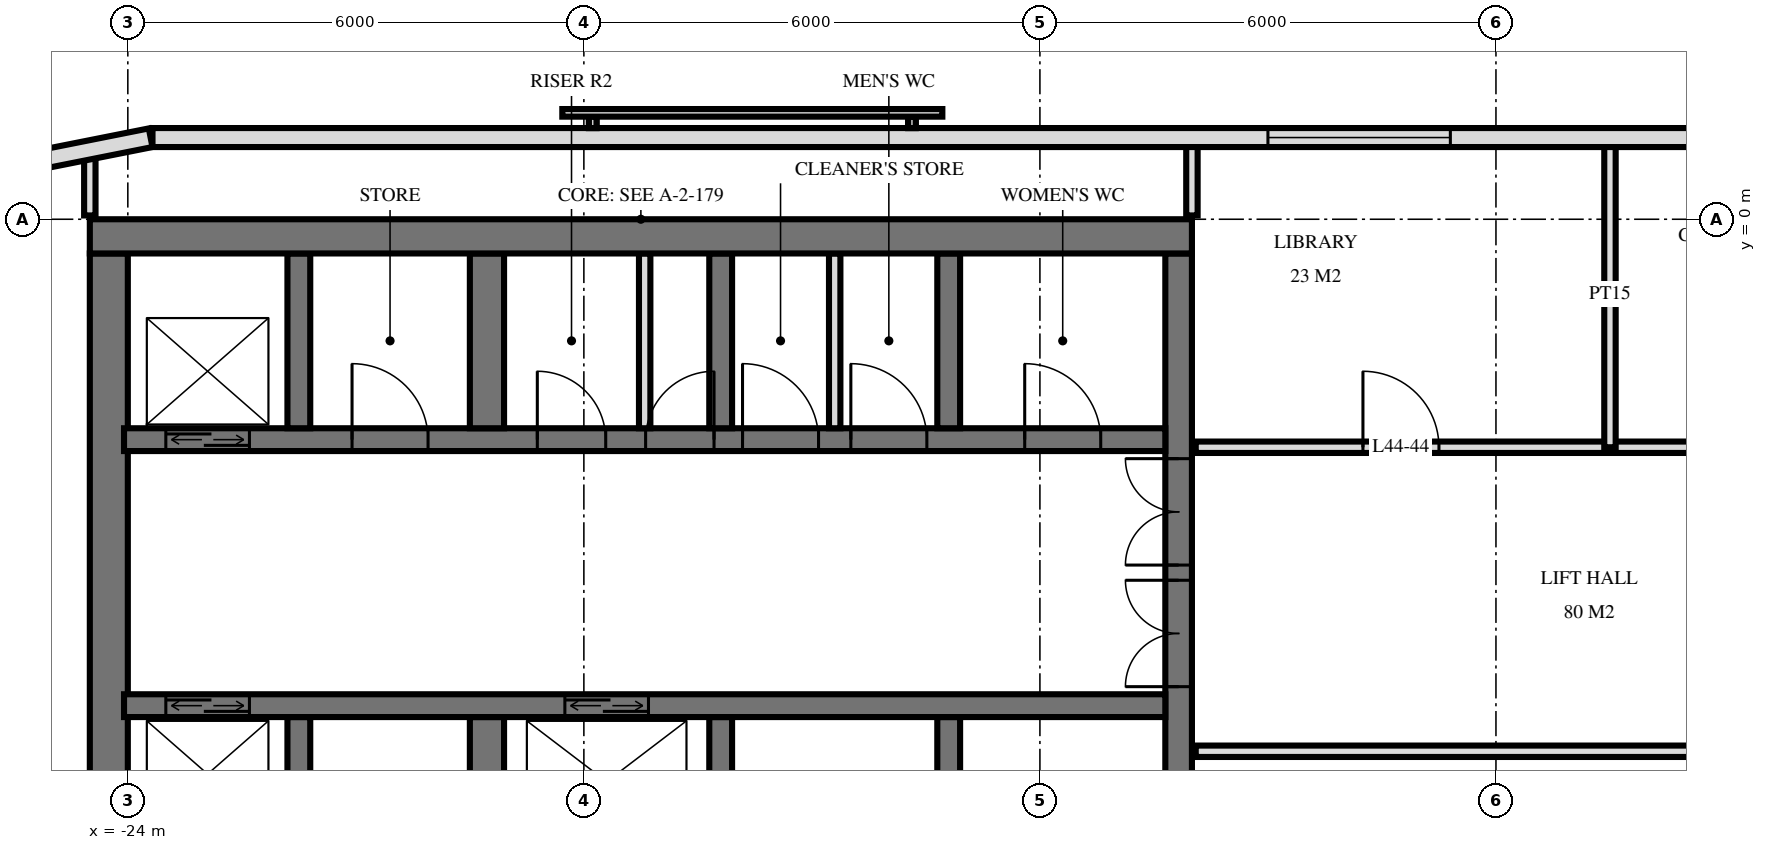
"""IFC4 building model, lengths in metres.
Left out: names, types, materials, properties, quantities, classifications, styles, units other than length and angle.
Written with IfcOpenShell. Run it as: python <this file> out.ifc"""

import sys

from ifc_helpers import new_model, si_unit, direction, frame, frame_2d, origin, place, context, subcontext, project, spatial, rectangle, extrude, element, fill, save


model = new_model("IFC4")
c1 = context("Model", 3, precision=1e-05, world=origin(), true_north=direction((0.0, 1.0)))
c2 = subcontext(c1, "Body", "Model", "MODEL_VIEW")
j1 = project(units=[si_unit("LENGTHUNIT", "METRE"), si_unit("PLANEANGLEUNIT", "RADIAN")], contexts=[c1])
p1 = place(None, origin())
s1 = spatial("IfcSite", under=j1, at=p1, CompositionType="ELEMENT")
p2 = place(p1, origin())
s2 = spatial("IfcBuilding", under=s1, at=p2, CompositionType="ELEMENT")
p3 = place(p2, frame((0.0, 0.0, 170.4)))
s3 = spatial("IfcBuildingStorey", under=s2, at=p3, CompositionType="ELEMENT", Elevation=170.4)
p4 = place(p3, frame((-24.5, -0.225, 0.0), z_axis=(0.0, 0.0, 1.0), x_axis=(1.0, 0.0, 0.0)))
e1 = element("IfcWall", 1, at=p4, inside=s3, PredefinedType="SHEAR", context=c2, shape_type="SweptSolid", body=[
    extrude(rectangle(XDim=14.5, YDim=0.45, at=frame_2d((7.25, 0.0))), origin(), (0.0, 0.0, 1.0), 3.6),
])
p5 = place(p3, frame((-10.175, -14.55, 0.0), z_axis=(0.0, 0.0, 1.0), x_axis=(0.0, 1.0, 0.0)))
e2 = element("IfcWall", 2, at=p5, inside=s3, PredefinedType="SHEAR", context=c2, shape_type="SweptSolid", body=[
    extrude(rectangle(XDim=14.1, YDim=0.35, at=frame_2d((7.05, 0.0))), origin(), (0.0, 0.0, 1.0), 3.6),
])
p6 = place(p5, frame((8.4, 0.0, 0.0)))
e3 = element("IfcOpeningElement", 3, at=p6, cuts=e2, PredefinedType="OPENING", context=c2, shape_type="SweptSolid", body=[
    extrude(rectangle(XDim=1.4, YDim=2.4, at=frame_2d((0.7, 1.2))), frame((0.0, 0.185, 0.0), z_axis=(0.0, -1.0, 0.0), x_axis=(1.0, 0.0, 0.0)), (0.0, 0.0, 1.0), 0.37),
])
p7 = place(p5, frame((10.0, 0.0, 0.0)))
e4 = element("IfcOpeningElement", 4, at=p7, cuts=e2, PredefinedType="OPENING", context=c2, shape_type="SweptSolid", body=[
    extrude(rectangle(XDim=1.4, YDim=2.4, at=frame_2d((0.7, 1.2))), frame((0.0, 0.185, 0.0), z_axis=(0.0, -1.0, 0.0), x_axis=(1.0, 0.0, 0.0)), (0.0, 0.0, 1.0), 0.37),
])
p8 = place(p5, frame((4.0, 0.0, 0.0)))
e5 = element("IfcOpeningElement", 5, at=p8, cuts=e2, PredefinedType="OPENING", context=c2, shape_type="SweptSolid", body=[
    extrude(rectangle(XDim=1.2, YDim=2.1, at=frame_2d((0.6, 1.05))), frame((0.0, 0.185, 0.0), z_axis=(0.0, -1.0, 0.0), x_axis=(1.0, 0.0, 0.0)), (0.0, 0.0, 1.0), 0.37),
])
p9 = place(p3, frame((-24.25, -14.55, 0.0), z_axis=(0.0, 0.0, 1.0), x_axis=(0.0, 1.0, 0.0)))
e6 = element("IfcWall", 6, at=p9, inside=s3, PredefinedType="SHEAR", context=c2, shape_type="SweptSolid", body=[
    extrude(rectangle(XDim=14.1, YDim=0.5, at=frame_2d((7.05, 0.0))), origin(), (0.0, 0.0, 1.0), 3.6),
])
p10 = place(p3, frame((-24.05, -2.9, 0.0), z_axis=(0.0, 0.0, 1.0), x_axis=(1.0, 0.0, 0.0)))
e7 = element("IfcWall", 7, at=p10, inside=s3, PredefinedType="SHEAR", context=c2, shape_type="SweptSolid", body=[
    extrude(rectangle(XDim=13.7, YDim=0.3, at=frame_2d((6.85, 0.0))), origin(), (0.0, 0.0, 1.0), 3.6),
])
p11 = place(p10, frame((0.55, 0.0, 0.0)))
e8 = element("IfcOpeningElement", 8, at=p11, cuts=e7, PredefinedType="OPENING", context=c2, shape_type="SweptSolid", body=[
    extrude(rectangle(XDim=1.1, YDim=2.1, at=frame_2d((0.55, 1.05))), frame((0.0, 0.16, 0.0), z_axis=(0.0, -1.0, 0.0), x_axis=(1.0, 0.0, 0.0)), (0.0, 0.0, 1.0), 0.32),
])
p12 = place(p10, frame((6.863, 0.0, 0.0)))
e9 = element("IfcOpeningElement", 9, at=p12, cuts=e7, PredefinedType="OPENING", context=c2, shape_type="SweptSolid", body=[
    extrude(rectangle(XDim=0.9, YDim=2.1, at=frame_2d((0.45, 1.05))), frame((0.0, 0.16, 0.0), z_axis=(0.0, -1.0, 0.0), x_axis=(1.0, 0.0, 0.0)), (0.0, 0.0, 1.0), 0.32),
])
p13 = place(p10, frame((5.438, 0.0, 0.0)))
e10 = element("IfcOpeningElement", 10, at=p13, cuts=e7, PredefinedType="OPENING", context=c2, shape_type="SweptSolid", body=[
    extrude(rectangle(XDim=0.9, YDim=2.1, at=frame_2d((0.45, 1.05))), frame((0.0, 0.16, 0.0), z_axis=(0.0, -1.0, 0.0), x_axis=(1.0, 0.0, 0.0)), (0.0, 0.0, 1.0), 0.32),
])
p14 = place(p10, frame((11.85, 0.0, 0.0)))
e11 = element("IfcOpeningElement", 11, at=p14, cuts=e7, PredefinedType="OPENING", context=c2, shape_type="SweptSolid", body=[
    extrude(rectangle(XDim=1.0, YDim=2.1, at=frame_2d((0.5, 1.05))), frame((0.0, 0.16, 0.0), z_axis=(0.0, -1.0, 0.0), x_axis=(1.0, 0.0, 0.0)), (0.0, 0.0, 1.0), 0.32),
])
p15 = place(p10, frame((9.562, 0.0, 0.0)))
e12 = element("IfcOpeningElement", 12, at=p15, cuts=e7, PredefinedType="OPENING", context=c2, shape_type="SweptSolid", body=[
    extrude(rectangle(XDim=1.0, YDim=2.1, at=frame_2d((0.5, 1.05))), frame((0.0, 0.16, 0.0), z_axis=(0.0, -1.0, 0.0), x_axis=(1.0, 0.0, 0.0)), (0.0, 0.0, 1.0), 0.32),
])
p16 = place(p10, frame((8.137, 0.0, 0.0)))
e13 = element("IfcOpeningElement", 13, at=p16, cuts=e7, PredefinedType="OPENING", context=c2, shape_type="SweptSolid", body=[
    extrude(rectangle(XDim=1.0, YDim=2.1, at=frame_2d((0.5, 1.05))), frame((0.0, 0.16, 0.0), z_axis=(0.0, -1.0, 0.0), x_axis=(1.0, 0.0, 0.0)), (0.0, 0.0, 1.0), 0.32),
])
p17 = place(p10, frame((3.0, 0.0, 0.0)))
e14 = element("IfcOpeningElement", 14, at=p17, cuts=e7, PredefinedType="OPENING", context=c2, shape_type="SweptSolid", body=[
    extrude(rectangle(XDim=1.0, YDim=2.1, at=frame_2d((0.5, 1.05))), frame((0.0, 0.16, 0.0), z_axis=(0.0, -1.0, 0.0), x_axis=(1.0, 0.0, 0.0)), (0.0, 0.0, 1.0), 0.32),
])
p18 = place(p3, frame((-24.05, -6.4, 0.0), z_axis=(0.0, 0.0, 1.0), x_axis=(1.0, 0.0, 0.0)))
e15 = element("IfcWall", 15, at=p18, inside=s3, PredefinedType="SHEAR", context=c2, shape_type="SweptSolid", body=[
    extrude(rectangle(XDim=13.7, YDim=0.3, at=frame_2d((6.85, 0.0))), origin(), (0.0, 0.0, 1.0), 3.6),
])
p19 = place(p18, frame((0.55, 0.0, 0.0)))
e16 = element("IfcOpeningElement", 16, at=p19, cuts=e15, PredefinedType="OPENING", context=c2, shape_type="SweptSolid", body=[
    extrude(rectangle(XDim=1.1, YDim=2.1, at=frame_2d((0.55, 1.05))), frame((0.0, 0.16, 0.0), z_axis=(0.0, -1.0, 0.0), x_axis=(1.0, 0.0, 0.0)), (0.0, 0.0, 1.0), 0.32),
])
p20 = place(p18, frame((5.8, 0.0, 0.0)))
e17 = element("IfcOpeningElement", 17, at=p20, cuts=e15, PredefinedType="OPENING", context=c2, shape_type="SweptSolid", body=[
    extrude(rectangle(XDim=1.1, YDim=2.1, at=frame_2d((0.55, 1.05))), frame((0.0, 0.16, 0.0), z_axis=(0.0, -1.0, 0.0), x_axis=(1.0, 0.0, 0.0)), (0.0, 0.0, 1.0), 0.32),
])
for number, where, z_axis, x_axis in (
    (18, (-13.2, -2.75, 0.0), (0.0, 0.0, 1.0), (0.0, 1.0, 0.0)),
    (19, (-13.2, -8.85, 0.0), (0.0, 0.0, 1.0), (0.0, 1.0, 0.0)),
    (20, (-16.2, -2.75, 0.0), (0.0, 0.0, 1.0), (0.0, 1.0, 0.0)),
    (21, (-16.2, -8.85, 0.0), (0.0, 0.0, 1.0), (0.0, 1.0, 0.0)),
):
    element("IfcWall", number, at=place(p3, frame(where, z_axis=z_axis, x_axis=x_axis)), inside=s3, PredefinedType="SHEAR", context=c2, shape_type="SweptSolid", body=[
        extrude(rectangle(XDim=2.3, YDim=0.3, at=frame_2d((1.15, 0.0))), origin(), (0.0, 0.0, 1.0), 3.6),
    ])
for number, where, z_axis, x_axis in (
    (22, (-19.275, -2.75, 0.0), (0.0, 0.0, 1.0), (0.0, 1.0, 0.0)),
    (23, (-19.275, -8.85, 0.0), (0.0, 0.0, 1.0), (0.0, 1.0, 0.0)),
):
    element("IfcWall", number, at=place(p3, frame(where, z_axis=z_axis, x_axis=x_axis)), inside=s3, PredefinedType="SHEAR", context=c2, shape_type="SweptSolid", body=[
        extrude(rectangle(XDim=2.3, YDim=0.45, at=frame_2d((1.15, 0.0))), origin(), (0.0, 0.0, 1.0), 3.6),
    ])
for number, where, z_axis, x_axis in (
    (24, (-21.75, -2.75, 0.0), (0.0, 0.0, 1.0), (0.0, 1.0, 0.0)),
    (25, (-21.75, -8.85, 0.0), (0.0, 0.0, 1.0), (0.0, 1.0, 0.0)),
):
    element("IfcWall", number, at=place(p3, frame(where, z_axis=z_axis, x_axis=x_axis)), inside=s3, PredefinedType="SHEAR", context=c2, shape_type="SweptSolid", body=[
        extrude(rectangle(XDim=2.3, YDim=0.3, at=frame_2d((1.15, 0.0))), origin(), (0.0, 0.0, 1.0), 3.6),
    ])
p21 = place(p3, frame((23.675, 1.075, 0.0), z_axis=(0.0, 0.0, 1.0), x_axis=(-1.0, 0.0, 0.0)))
e26 = element("IfcWall", 26, at=p21, inside=s3, PredefinedType="SOLIDWALL", context=c2, shape_type="SweptSolid", body=[
    extrude(rectangle(XDim=47.351, YDim=0.25, at=frame_2d((23.675, 0.0))), origin(), (0.0, 0.0, 1.0), 3.32),
])
p22 = place(p21, frame((20.225, 0.0, 0.3)))
e27 = element("IfcOpeningElement", 27, at=p22, cuts=e26, PredefinedType="OPENING", context=c2, shape_type="SweptSolid", body=[
    extrude(rectangle(XDim=2.4, YDim=2.1, at=frame_2d((1.2, 1.05))), frame((0.0, 0.135, 0.0), z_axis=(0.0, -1.0, 0.0), x_axis=(1.0, 0.0, 0.0)), (0.0, 0.0, 1.0), 0.27),
])
p23 = place(p21, frame((30.275, 0.0, 0.3)))
e28 = element("IfcOpeningElement", 28, at=p23, cuts=e26, PredefinedType="OPENING", context=c2, shape_type="SweptSolid", body=[
    extrude(rectangle(XDim=2.4, YDim=2.1, at=frame_2d((1.2, 1.05))), frame((0.0, 0.135, 0.0), z_axis=(0.0, -1.0, 0.0), x_axis=(1.0, 0.0, 0.0)), (0.0, 0.0, 1.0), 0.27),
])
p24 = place(p3, frame((-23.7, 1.073, 0.0), z_axis=(0.0, 0.0, 1.0), x_axis=(-0.980803419081, -0.194999110559, 0.0)))
e29 = element("IfcWall", 29, at=p24, inside=s3, PredefinedType="SOLIDWALL", context=c2, shape_type="SweptSolid", body=[
    extrude(rectangle(XDim=1.681, YDim=0.25, at=frame_2d((0.841, 0.0))), origin(), (0.0, 0.0, 1.0), 3.32),
])
for number, where, z_axis, x_axis in (
    (30, (-17.2, -2.75, 0.0), (0.0, 0.0, 1.0), (0.0, 1.0, 0.0)),
    (31, (-14.7, -2.75, 0.0), (0.0, 0.0, 1.0), (0.0, 1.0, 0.0)),
):
    element("IfcWall", number, at=place(p3, frame(where, z_axis=z_axis, x_axis=x_axis)), inside=s3, PredefinedType="PARTITIONING", context=c2, shape_type="SweptSolid", body=[
        extrude(rectangle(XDim=2.3, YDim=0.15, at=frame_2d((1.15, 0.0))), origin(), (0.0, 0.0, 1.0), 3.3),
    ])
p25 = place(p3, frame((-4.5, -3.0, 0.0), z_axis=(0.0, 0.0, 1.0), x_axis=(0.0, 1.0, 0.0)))
e32 = element("IfcWall", 32, at=p25, inside=s3, PredefinedType="PARTITIONING", context=c2, shape_type="SweptSolid", body=[
    extrude(rectangle(XDim=4.02, YDim=0.15, at=frame_2d((2.01, 0.0))), origin(), (0.0, 0.0, 1.0), 3.32),
])
p26 = place(p3, frame((-10.0, 0.05, 0.0), z_axis=(0.0, 0.0, 1.0), x_axis=(0.0, 1.0, 0.0)))
e33 = element("IfcWall", 33, at=p26, inside=s3, PredefinedType="PARTITIONING", context=c2, shape_type="SweptSolid", body=[
    extrude(rectangle(XDim=0.97, YDim=0.15, at=frame_2d((0.485, 0.0))), origin(), (0.0, 0.0, 1.0), 3.32),
])
p27 = place(p3, frame((-24.5, 0.05, 0.0), z_axis=(0.0, 0.0, 1.0), x_axis=(0.0, 1.0, 0.0)))
e34 = element("IfcWall", 34, at=p27, inside=s3, PredefinedType="PARTITIONING", context=c2, shape_type="SweptSolid", body=[
    extrude(rectangle(XDim=0.807, YDim=0.15, at=frame_2d((0.404, 0.0))), origin(), (0.0, 0.0, 1.0), 3.32),
])
p28 = place(p3, frame((-9.95, -7.0, 0.0), z_axis=(0.0, 0.0, 1.0), x_axis=(1.0, 0.0, 0.0)))
e35 = element("IfcWall", 35, at=p28, inside=s3, PredefinedType="PARTITIONING", context=c2, shape_type="SweptSolid", body=[
    extrude(rectangle(XDim=19.9, YDim=0.15, at=frame_2d((9.95, 0.0))), origin(), (0.0, 0.0, 1.0), 3.32),
])
p29 = place(p28, frame((9.45, 0.0, 0.0)))
e36 = element("IfcOpeningElement", 36, at=p29, cuts=e35, PredefinedType="OPENING", context=c2, shape_type="SweptSolid", body=[
    extrude(rectangle(XDim=1.0, YDim=2.1, at=frame_2d((0.5, 1.05))), frame((0.0, 0.085, 0.0), z_axis=(0.0, -1.0, 0.0), x_axis=(1.0, 0.0, 0.0)), (0.0, 0.0, 1.0), 0.17),
])
p30 = place(p28, frame((15.45, 0.0, 0.0)))
e37 = element("IfcOpeningElement", 37, at=p30, cuts=e35, PredefinedType="OPENING", context=c2, shape_type="SweptSolid", body=[
    extrude(rectangle(XDim=1.0, YDim=2.1, at=frame_2d((0.5, 1.05))), frame((0.0, 0.085, 0.0), z_axis=(0.0, -1.0, 0.0), x_axis=(1.0, 0.0, 0.0)), (0.0, 0.0, 1.0), 0.17),
])
p31 = place(p3, frame((-9.95, -3.0, 0.0), z_axis=(0.0, 0.0, 1.0), x_axis=(1.0, 0.0, 0.0)))
e38 = element("IfcWall", 38, at=p31, inside=s3, PredefinedType="PARTITIONING", context=c2, shape_type="SweptSolid", body=[
    extrude(rectangle(XDim=19.9, YDim=0.15, at=frame_2d((9.95, 0.0))), origin(), (0.0, 0.0, 1.0), 3.32),
])
p32 = place(p31, frame((2.2, 0.0, 0.0)))
e39 = element("IfcOpeningElement", 39, at=p32, cuts=e38, PredefinedType="OPENING", context=c2, shape_type="SweptSolid", body=[
    extrude(rectangle(XDim=1.0, YDim=2.1, at=frame_2d((0.5, 1.05))), frame((0.0, 0.085, 0.0), z_axis=(0.0, -1.0, 0.0), x_axis=(1.0, 0.0, 0.0)), (0.0, 0.0, 1.0), 0.17),
])
p33 = place(p31, frame((7.2, 0.0, 0.0)))
e40 = element("IfcOpeningElement", 40, at=p33, cuts=e38, PredefinedType="OPENING", context=c2, shape_type="SweptSolid", body=[
    extrude(rectangle(XDim=1.0, YDim=2.1, at=frame_2d((0.5, 1.05))), frame((0.0, 0.085, 0.0), z_axis=(0.0, -1.0, 0.0), x_axis=(1.0, 0.0, 0.0)), (0.0, 0.0, 1.0), 0.17),
])
p34 = place(p31, frame((11.7, 0.0, 0.0)))
e41 = element("IfcOpeningElement", 41, at=p34, cuts=e38, PredefinedType="OPENING", context=c2, shape_type="SweptSolid", body=[
    extrude(rectangle(XDim=1.0, YDim=2.1, at=frame_2d((0.5, 1.05))), frame((0.0, 0.085, 0.0), z_axis=(0.0, -1.0, 0.0), x_axis=(1.0, 0.0, 0.0)), (0.0, 0.0, 1.0), 0.17),
])
p35 = place(p31, frame((15.45, 0.0, 0.0)))
e42 = element("IfcOpeningElement", 42, at=p35, cuts=e38, PredefinedType="OPENING", context=c2, shape_type="SweptSolid", body=[
    extrude(rectangle(XDim=1.0, YDim=2.1, at=frame_2d((0.5, 1.05))), frame((0.0, 0.085, 0.0), z_axis=(0.0, -1.0, 0.0), x_axis=(1.0, 0.0, 0.0)), (0.0, 0.0, 1.0), 0.17),
])
p36 = place(p31, frame((18.2, 0.0, 0.0)))
e43 = element("IfcOpeningElement", 43, at=p36, cuts=e38, PredefinedType="OPENING", context=c2, shape_type="SweptSolid", body=[
    extrude(rectangle(XDim=1.0, YDim=2.1, at=frame_2d((0.5, 1.05))), frame((0.0, 0.085, 0.0), z_axis=(0.0, -1.0, 0.0), x_axis=(1.0, 0.0, 0.0)), (0.0, 0.0, 1.0), 0.17),
])
p37 = place(p23, origin())
e44 = element("IfcWindow", 44, at=p37, inside=s3, PartitioningType="SINGLE_PANEL", PredefinedType="WINDOW", context=c2, shape_type="SweptSolid", body=[
    extrude(rectangle(XDim=2.4, YDim=2.1, at=frame_2d((1.2, 1.05))), frame((0.0, 0.03, 0.0), z_axis=(0.0, -1.0, 0.0), x_axis=(1.0, 0.0, 0.0)), (0.0, 0.0, 1.0), 0.06),
])
fill(e28, e44)
p38 = place(p11, origin())
e45 = element("IfcDoor", 45, at=p38, inside=s3, OperationType="DOUBLE_DOOR_SLIDING", PredefinedType="USERDEFINED", context=c2, shape_type="SweptSolid", body=[
    extrude(rectangle(XDim=1.1, YDim=2.1, at=frame_2d((0.55, 1.05))), frame((0.0, 0.025, 0.0), z_axis=(0.0, -1.0, 0.0), x_axis=(1.0, 0.0, 0.0)), (0.0, 0.0, 1.0), 0.05),
])
fill(e8, e45)
p39 = place(p19, origin())
e46 = element("IfcDoor", 46, at=p39, inside=s3, OperationType="DOUBLE_DOOR_SLIDING", PredefinedType="USERDEFINED", context=c2, shape_type="SweptSolid", body=[
    extrude(rectangle(XDim=1.1, YDim=2.1, at=frame_2d((0.55, 1.05))), frame((0.0, 0.025, 0.0), z_axis=(0.0, -1.0, 0.0), x_axis=(1.0, 0.0, 0.0)), (0.0, 0.0, 1.0), 0.05),
])
fill(e16, e46)
p40 = place(p20, origin())
e47 = element("IfcDoor", 47, at=p40, inside=s3, OperationType="DOUBLE_DOOR_SLIDING", PredefinedType="USERDEFINED", context=c2, shape_type="SweptSolid", body=[
    extrude(rectangle(XDim=1.1, YDim=2.1, at=frame_2d((0.55, 1.05))), frame((0.0, 0.025, 0.0), z_axis=(0.0, -1.0, 0.0), x_axis=(1.0, 0.0, 0.0)), (0.0, 0.0, 1.0), 0.05),
])
fill(e17, e47)
p41 = place(p6, origin())
e48 = element("IfcDoor", 48, at=p41, inside=s3, OperationType="DOUBLE_DOOR_SINGLE_SWING", PredefinedType="DOOR", context=c2, shape_type="SweptSolid", body=[
    extrude(rectangle(XDim=1.4, YDim=2.4, at=frame_2d((0.7, 1.2))), frame((0.0, 0.025, 0.0), z_axis=(0.0, -1.0, 0.0), x_axis=(1.0, 0.0, 0.0)), (0.0, 0.0, 1.0), 0.05),
])
fill(e3, e48)
p42 = place(p7, origin())
e49 = element("IfcDoor", 49, at=p42, inside=s3, OperationType="DOUBLE_DOOR_SINGLE_SWING", PredefinedType="DOOR", context=c2, shape_type="SweptSolid", body=[
    extrude(rectangle(XDim=1.4, YDim=2.4, at=frame_2d((0.7, 1.2))), frame((0.0, 0.025, 0.0), z_axis=(0.0, -1.0, 0.0), x_axis=(1.0, 0.0, 0.0)), (0.0, 0.0, 1.0), 0.05),
])
fill(e4, e49)
p43 = place(p12, origin())
e50 = element("IfcDoor", 50, at=p43, inside=s3, OperationType="SINGLE_SWING_LEFT", PredefinedType="DOOR", context=c2, shape_type="SweptSolid", body=[
    extrude(rectangle(XDim=0.9, YDim=2.1, at=frame_2d((0.45, 1.05))), frame((0.0, 0.025, 0.0), z_axis=(0.0, -1.0, 0.0), x_axis=(1.0, 0.0, 0.0)), (0.0, 0.0, 1.0), 0.05),
])
fill(e9, e50)
p44 = place(p13, origin())
e51 = element("IfcDoor", 51, at=p44, inside=s3, OperationType="SINGLE_SWING_RIGHT", PredefinedType="DOOR", context=c2, shape_type="SweptSolid", body=[
    extrude(rectangle(XDim=0.9, YDim=2.1, at=frame_2d((0.45, 1.05))), frame((0.0, 0.025, 0.0), z_axis=(0.0, -1.0, 0.0), x_axis=(1.0, 0.0, 0.0)), (0.0, 0.0, 1.0), 0.05),
])
fill(e10, e51)
p45 = place(p14, origin())
e52 = element("IfcDoor", 52, at=p45, inside=s3, OperationType="SINGLE_SWING_RIGHT", PredefinedType="DOOR", context=c2, shape_type="SweptSolid", body=[
    extrude(rectangle(XDim=1.0, YDim=2.1, at=frame_2d((0.5, 1.05))), frame((0.0, 0.025, 0.0), z_axis=(0.0, -1.0, 0.0), x_axis=(1.0, 0.0, 0.0)), (0.0, 0.0, 1.0), 0.05),
])
fill(e11, e52)
p46 = place(p15, origin())
e53 = element("IfcDoor", 53, at=p46, inside=s3, OperationType="SINGLE_SWING_RIGHT", PredefinedType="DOOR", context=c2, shape_type="SweptSolid", body=[
    extrude(rectangle(XDim=1.0, YDim=2.1, at=frame_2d((0.5, 1.05))), frame((0.0, 0.025, 0.0), z_axis=(0.0, -1.0, 0.0), x_axis=(1.0, 0.0, 0.0)), (0.0, 0.0, 1.0), 0.05),
])
fill(e12, e53)
p47 = place(p16, origin())
e54 = element("IfcDoor", 54, at=p47, inside=s3, OperationType="SINGLE_SWING_RIGHT", PredefinedType="DOOR", context=c2, shape_type="SweptSolid", body=[
    extrude(rectangle(XDim=1.0, YDim=2.1, at=frame_2d((0.5, 1.05))), frame((0.0, 0.025, 0.0), z_axis=(0.0, -1.0, 0.0), x_axis=(1.0, 0.0, 0.0)), (0.0, 0.0, 1.0), 0.05),
])
fill(e13, e54)
p48 = place(p17, origin())
e55 = element("IfcDoor", 55, at=p48, inside=s3, OperationType="SINGLE_SWING_RIGHT", PredefinedType="DOOR", context=c2, shape_type="SweptSolid", body=[
    extrude(rectangle(XDim=1.0, YDim=2.1, at=frame_2d((0.5, 1.05))), frame((0.0, 0.025, 0.0), z_axis=(0.0, -1.0, 0.0), x_axis=(1.0, 0.0, 0.0)), (0.0, 0.0, 1.0), 0.05),
])
fill(e14, e55)
p49 = place(p32, origin())
e56 = element("IfcDoor", 56, at=p49, inside=s3, OperationType="SINGLE_SWING_RIGHT", PredefinedType="DOOR", context=c2, shape_type="SweptSolid", body=[
    extrude(rectangle(XDim=1.0, YDim=2.1, at=frame_2d((0.5, 1.05))), frame((0.0, 0.025, 0.0), z_axis=(0.0, -1.0, 0.0), x_axis=(1.0, 0.0, 0.0)), (0.0, 0.0, 1.0), 0.05),
])
fill(e39, e56)
save(model, sys.argv[1])
